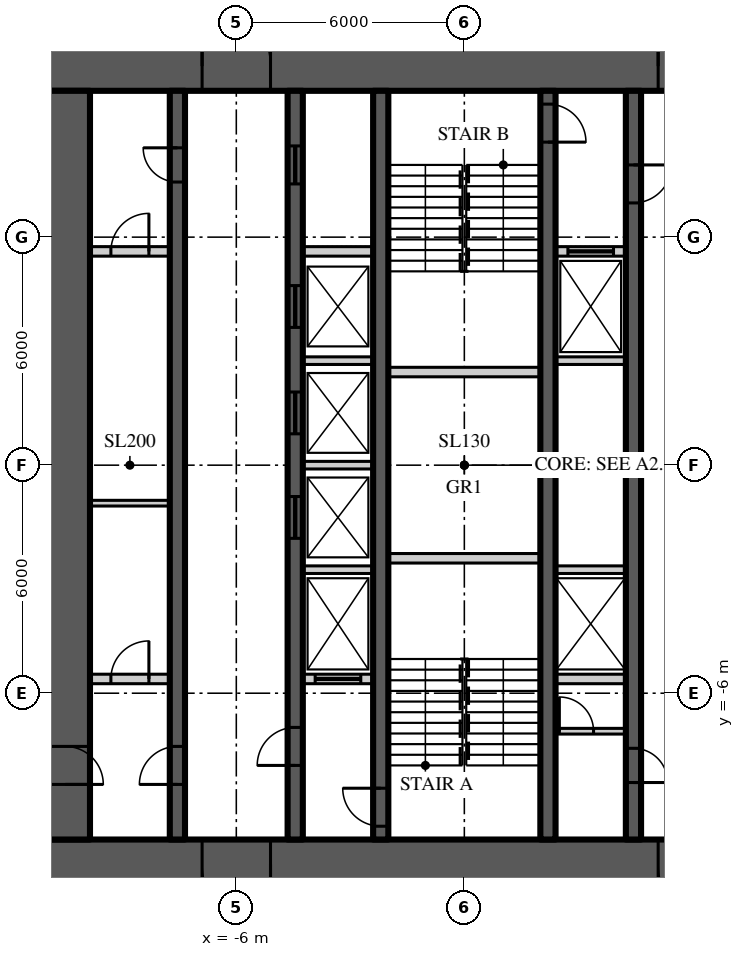
"""IFC4 building model, lengths in metres.
Left out: names, types, materials, properties, quantities, classifications, styles, units other than length and angle.
Written with IfcOpenShell. Run it as: python <this file> out.ifc"""

import sys

from ifc_helpers import new_model, si_unit, direction, frame, frame_2d, origin, place, context, subcontext, project, spatial, rectangle, extrude, element, fill, save


model = new_model("IFC4")
c1 = context("Model", 3, precision=1e-05, world=origin(), true_north=direction((0.0, 1.0)))
c2 = subcontext(c1, "Body", "Model", "MODEL_VIEW")
j1 = project(units=[si_unit("LENGTHUNIT", "METRE"), si_unit("PLANEANGLEUNIT", "RADIAN")], contexts=[c1])
p1 = place(None, origin())
s1 = spatial("IfcSite", under=j1, at=p1, CompositionType="ELEMENT")
p2 = place(p1, origin())
s2 = spatial("IfcBuilding", under=s1, at=p2, CompositionType="ELEMENT")
p3 = place(p2, frame((0.0, 0.0, 135.9)))
s3 = spatial("IfcBuildingStorey", under=s2, at=p3, CompositionType="ELEMENT", Elevation=135.9)
p4 = place(p3, frame((-11.15, 10.5, 0.0), z_axis=(0.0, 0.0, 1.0), x_axis=(1.0, 0.0, 0.0)))
e1 = element("IfcWall", 1, at=p4, inside=s3, PredefinedType="SHEAR", context=c2, shape_type="SweptSolid", body=[
    extrude(rectangle(XDim=22.3, YDim=1.3, at=frame_2d((11.15, 0.0))), origin(), (0.0, 0.0, 1.0), 3.9),
])
p5 = place(p4, frame((4.25, 0.0, 0.0)))
e2 = element("IfcOpeningElement", 2, at=p5, cuts=e1, PredefinedType="OPENING", context=c2, shape_type="SweptSolid", body=[
    extrude(rectangle(XDim=1.8, YDim=2.2, at=frame_2d((0.9, 1.1))), frame((0.0, 0.66, 0.0), z_axis=(0.0, -1.0, 0.0), x_axis=(1.0, 0.0, 0.0)), (0.0, 0.0, 1.0), 1.32),
])
p6 = place(p4, frame((16.25, 0.0, 0.0)))
e3 = element("IfcOpeningElement", 3, at=p6, cuts=e1, PredefinedType="OPENING", context=c2, shape_type="SweptSolid", body=[
    extrude(rectangle(XDim=1.8, YDim=2.2, at=frame_2d((0.9, 1.1))), frame((0.0, 0.66, 0.0), z_axis=(0.0, -1.0, 0.0), x_axis=(1.0, 0.0, 0.0)), (0.0, 0.0, 1.0), 1.32),
])
p7 = place(p3, frame((11.15, -10.5, 0.0), z_axis=(0.0, 0.0, 1.0), x_axis=(-1.0, 0.0, 0.0)))
e4 = element("IfcWall", 4, at=p7, inside=s3, PredefinedType="SHEAR", context=c2, shape_type="SweptSolid", body=[
    extrude(rectangle(XDim=22.3, YDim=1.3, at=frame_2d((11.15, 0.0))), origin(), (0.0, 0.0, 1.0), 3.9),
])
p8 = place(p7, frame((16.25, 0.0, 0.0)))
e5 = element("IfcOpeningElement", 5, at=p8, cuts=e4, PredefinedType="OPENING", context=c2, shape_type="SweptSolid", body=[
    extrude(rectangle(XDim=1.8, YDim=2.2, at=frame_2d((0.9, 1.1))), frame((0.0, 0.66, 0.0), z_axis=(0.0, -1.0, 0.0), x_axis=(1.0, 0.0, 0.0)), (0.0, 0.0, 1.0), 1.32),
])
p9 = place(p7, frame((4.25, 0.0, 0.0)))
e6 = element("IfcOpeningElement", 6, at=p9, cuts=e4, PredefinedType="OPENING", context=c2, shape_type="SweptSolid", body=[
    extrude(rectangle(XDim=1.8, YDim=2.2, at=frame_2d((0.9, 1.1))), frame((0.0, 0.66, 0.0), z_axis=(0.0, -1.0, 0.0), x_axis=(1.0, 0.0, 0.0)), (0.0, 0.0, 1.0), 1.32),
])
p10 = place(p3, frame((-10.5, 9.85, 0.0), z_axis=(0.0, 0.0, 1.0), x_axis=(0.0, -1.0, 0.0)))
e7 = element("IfcWall", 7, at=p10, inside=s3, PredefinedType="SHEAR", context=c2, shape_type="SweptSolid", body=[
    extrude(rectangle(XDim=19.7, YDim=1.3, at=frame_2d((9.85, 0.0))), origin(), (0.0, 0.0, 1.0), 3.9),
])
p11 = place(p10, frame((17.25, 0.0, 0.0)))
e8 = element("IfcOpeningElement", 8, at=p11, cuts=e7, PredefinedType="OPENING", context=c2, shape_type="SweptSolid", body=[
    extrude(rectangle(XDim=1.0, YDim=2.2, at=frame_2d((0.5, 1.1))), frame((0.0, 0.66, 0.0), z_axis=(0.0, -1.0, 0.0), x_axis=(1.0, 0.0, 0.0)), (0.0, 0.0, 1.0), 1.32),
])
p12 = place(p3, frame((-7.55, -9.85, 0.0), z_axis=(0.0, 0.0, 1.0), x_axis=(0.0, 1.0, 0.0)))
e9 = element("IfcWall", 9, at=p12, inside=s3, PredefinedType="SHEAR", context=c2, shape_type="SweptSolid", body=[
    extrude(rectangle(XDim=19.7, YDim=0.4, at=frame_2d((9.85, 0.0))), origin(), (0.0, 0.0, 1.0), 3.9),
])
p13 = place(p12, frame((1.45, 0.0, 0.0)))
e10 = element("IfcOpeningElement", 10, at=p13, cuts=e9, PredefinedType="OPENING", context=c2, shape_type="SweptSolid", body=[
    extrude(rectangle(XDim=1.0, YDim=2.2, at=frame_2d((0.5, 1.1))), frame((0.0, 0.21, 0.0), z_axis=(0.0, -1.0, 0.0), x_axis=(1.0, 0.0, 0.0)), (0.0, 0.0, 1.0), 0.42),
])
p14 = place(p12, frame((17.3, 0.0, 0.0)))
e11 = element("IfcOpeningElement", 11, at=p14, cuts=e9, PredefinedType="OPENING", context=c2, shape_type="SweptSolid", body=[
    extrude(rectangle(XDim=0.9, YDim=2.1, at=frame_2d((0.45, 1.05))), frame((0.0, 0.21, 0.0), z_axis=(0.0, -1.0, 0.0), x_axis=(1.0, 0.0, 0.0)), (0.0, 0.0, 1.0), 0.42),
])
p15 = place(p3, frame((-4.45, -9.85, 0.0), z_axis=(0.0, 0.0, 1.0), x_axis=(0.0, 1.0, 0.0)))
e12 = element("IfcWall", 12, at=p15, inside=s3, PredefinedType="SHEAR", context=c2, shape_type="SweptSolid", body=[
    extrude(rectangle(XDim=19.7, YDim=0.4, at=frame_2d((9.85, 0.0))), origin(), (0.0, 0.0, 1.0), 3.9),
])
p16 = place(p15, frame((1.95, 0.0, 0.0)))
e13 = element("IfcOpeningElement", 13, at=p16, cuts=e12, PredefinedType="OPENING", context=c2, shape_type="SweptSolid", body=[
    extrude(rectangle(XDim=1.0, YDim=2.2, at=frame_2d((0.5, 1.1))), frame((0.0, 0.21, 0.0), z_axis=(0.0, -1.0, 0.0), x_axis=(1.0, 0.0, 0.0)), (0.0, 0.0, 1.0), 0.42),
])
p17 = place(p15, frame((17.25, 0.0, 0.0)))
e14 = element("IfcOpeningElement", 14, at=p17, cuts=e12, PredefinedType="OPENING", context=c2, shape_type="SweptSolid", body=[
    extrude(rectangle(XDim=1.0, YDim=2.1, at=frame_2d((0.5, 1.05))), frame((0.0, 0.21, 0.0), z_axis=(0.0, -1.0, 0.0), x_axis=(1.0, 0.0, 0.0)), (0.0, 0.0, 1.0), 0.42),
])
p18 = place(p15, frame((7.925, 0.0, 0.0)))
e15 = element("IfcOpeningElement", 15, at=p18, cuts=e12, PredefinedType="OPENING", context=c2, shape_type="SweptSolid", body=[
    extrude(rectangle(XDim=1.1, YDim=2.2, at=frame_2d((0.55, 1.1))), frame((0.0, 0.21, 0.0), z_axis=(0.0, -1.0, 0.0), x_axis=(1.0, 0.0, 0.0)), (0.0, 0.0, 1.0), 0.42),
])
p19 = place(p15, frame((10.675, 0.0, 0.0)))
e16 = element("IfcOpeningElement", 16, at=p19, cuts=e12, PredefinedType="OPENING", context=c2, shape_type="SweptSolid", body=[
    extrude(rectangle(XDim=1.1, YDim=2.2, at=frame_2d((0.55, 1.1))), frame((0.0, 0.21, 0.0), z_axis=(0.0, -1.0, 0.0), x_axis=(1.0, 0.0, 0.0)), (0.0, 0.0, 1.0), 0.42),
])
p20 = place(p15, frame((13.475, 0.0, 0.0)))
e17 = element("IfcOpeningElement", 17, at=p20, cuts=e12, PredefinedType="OPENING", context=c2, shape_type="SweptSolid", body=[
    extrude(rectangle(XDim=1.1, YDim=2.2, at=frame_2d((0.55, 1.1))), frame((0.0, 0.21, 0.0), z_axis=(0.0, -1.0, 0.0), x_axis=(1.0, 0.0, 0.0)), (0.0, 0.0, 1.0), 0.42),
])
p21 = place(p3, frame((4.45, 9.85, 0.0), z_axis=(0.0, 0.0, 1.0), x_axis=(0.0, -1.0, 0.0)))
e18 = element("IfcWall", 18, at=p21, inside=s3, PredefinedType="SHEAR", context=c2, shape_type="SweptSolid", body=[
    extrude(rectangle(XDim=19.7, YDim=0.4, at=frame_2d((9.85, 0.0))), origin(), (0.0, 0.0, 1.0), 3.9),
])
p22 = place(p21, frame((1.95, 0.0, 0.0)))
e19 = element("IfcOpeningElement", 19, at=p22, cuts=e18, PredefinedType="OPENING", context=c2, shape_type="SweptSolid", body=[
    extrude(rectangle(XDim=1.0, YDim=2.2, at=frame_2d((0.5, 1.1))), frame((0.0, 0.21, 0.0), z_axis=(0.0, -1.0, 0.0), x_axis=(1.0, 0.0, 0.0)), (0.0, 0.0, 1.0), 0.42),
])
p23 = place(p21, frame((17.3, 0.0, 0.0)))
e20 = element("IfcOpeningElement", 20, at=p23, cuts=e18, PredefinedType="OPENING", context=c2, shape_type="SweptSolid", body=[
    extrude(rectangle(XDim=0.9, YDim=2.1, at=frame_2d((0.45, 1.05))), frame((0.0, 0.21, 0.0), z_axis=(0.0, -1.0, 0.0), x_axis=(1.0, 0.0, 0.0)), (0.0, 0.0, 1.0), 0.42),
])
p24 = place(p3, frame((-2.2, -9.85, 0.0), z_axis=(0.0, 0.0, 1.0), x_axis=(0.0, 1.0, 0.0)))
e21 = element("IfcWall", 21, at=p24, inside=s3, PredefinedType="SHEAR", context=c2, shape_type="SweptSolid", body=[
    extrude(rectangle(XDim=19.7, YDim=0.4, at=frame_2d((9.85, 0.0))), origin(), (0.0, 0.0, 1.0), 3.9),
])
p25 = place(p24, frame((0.35, 0.0, 0.0)))
e22 = element("IfcOpeningElement", 22, at=p25, cuts=e21, PredefinedType="OPENING", context=c2, shape_type="SweptSolid", body=[
    extrude(rectangle(XDim=1.0, YDim=2.2, at=frame_2d((0.5, 1.1))), frame((0.0, 0.21, 0.0), z_axis=(0.0, -1.0, 0.0), x_axis=(1.0, 0.0, 0.0)), (0.0, 0.0, 1.0), 0.42),
])
p26 = place(p3, frame((2.2, 9.85, 0.0), z_axis=(0.0, 0.0, 1.0), x_axis=(0.0, -1.0, 0.0)))
e23 = element("IfcWall", 23, at=p26, inside=s3, PredefinedType="SHEAR", context=c2, shape_type="SweptSolid", body=[
    extrude(rectangle(XDim=19.7, YDim=0.4, at=frame_2d((9.85, 0.0))), origin(), (0.0, 0.0, 1.0), 3.9),
])
p27 = place(p26, frame((0.35, 0.0, 0.0)))
e24 = element("IfcOpeningElement", 24, at=p27, cuts=e23, PredefinedType="OPENING", context=c2, shape_type="SweptSolid", body=[
    extrude(rectangle(XDim=1.0, YDim=2.2, at=frame_2d((0.5, 1.1))), frame((0.0, 0.21, 0.0), z_axis=(0.0, -1.0, 0.0), x_axis=(1.0, 0.0, 0.0)), (0.0, 0.0, 1.0), 0.42),
])
p28 = place(p3, frame((-9.85, 5.625, 0.0), z_axis=(0.0, 0.0, 1.0), x_axis=(1.0, 0.0, 0.0)))
e25 = element("IfcWall", 25, at=p28, inside=s3, PredefinedType="SOLIDWALL", context=c2, shape_type="SweptSolid", body=[
    extrude(rectangle(XDim=2.1, YDim=0.25, at=frame_2d((1.05, 0.0))), origin(), (0.0, 0.0, 1.0), 3.7),
])
p29 = place(p28, frame((0.55, 0.0, 0.0)))
e26 = element("IfcOpeningElement", 26, at=p29, cuts=e25, PredefinedType="OPENING", context=c2, shape_type="SweptSolid", body=[
    extrude(rectangle(XDim=1.0, YDim=2.2, at=frame_2d((0.5, 1.1))), frame((0.0, 0.135, 0.0), z_axis=(0.0, -1.0, 0.0), x_axis=(1.0, 0.0, 0.0)), (0.0, 0.0, 1.0), 0.27),
])
p30 = place(p3, frame((-4.25, 5.625, 0.0), z_axis=(0.0, 0.0, 1.0), x_axis=(1.0, 0.0, 0.0)))
e27 = element("IfcWall", 27, at=p30, inside=s3, PredefinedType="SOLIDWALL", context=c2, shape_type="SweptSolid", body=[
    extrude(rectangle(XDim=1.85, YDim=0.25, at=frame_2d((0.925, 0.0))), origin(), (0.0, 0.0, 1.0), 3.7),
])
p31 = place(p3, frame((2.4, 5.625, 0.0), z_axis=(0.0, 0.0, 1.0), x_axis=(1.0, 0.0, 0.0)))
e28 = element("IfcWall", 28, at=p31, inside=s3, PredefinedType="SOLIDWALL", context=c2, shape_type="SweptSolid", body=[
    extrude(rectangle(XDim=1.85, YDim=0.25, at=frame_2d((0.925, 0.0))), origin(), (0.0, 0.0, 1.0), 3.7),
])
p32 = place(p31, frame((0.325, 0.0, 0.0)))
e29 = element("IfcOpeningElement", 29, at=p32, cuts=e28, PredefinedType="OPENING", context=c2, shape_type="SweptSolid", body=[
    extrude(rectangle(XDim=1.2, YDim=2.2, at=frame_2d((0.6, 1.1))), frame((0.0, 0.135, 0.0), z_axis=(0.0, -1.0, 0.0), x_axis=(1.0, 0.0, 0.0)), (0.0, 0.0, 1.0), 0.27),
])
p33 = place(p3, frame((-9.85, -5.625, 0.0), z_axis=(0.0, 0.0, 1.0), x_axis=(1.0, 0.0, 0.0)))
e30 = element("IfcWall", 30, at=p33, inside=s3, PredefinedType="SOLIDWALL", context=c2, shape_type="SweptSolid", body=[
    extrude(rectangle(XDim=2.1, YDim=0.25, at=frame_2d((1.05, 0.0))), origin(), (0.0, 0.0, 1.0), 3.7),
])
p34 = place(p33, frame((0.55, 0.0, 0.0)))
e31 = element("IfcOpeningElement", 31, at=p34, cuts=e30, PredefinedType="OPENING", context=c2, shape_type="SweptSolid", body=[
    extrude(rectangle(XDim=1.0, YDim=2.2, at=frame_2d((0.5, 1.1))), frame((0.0, 0.135, 0.0), z_axis=(0.0, -1.0, 0.0), x_axis=(1.0, 0.0, 0.0)), (0.0, 0.0, 1.0), 0.27),
])
p35 = place(p3, frame((-4.25, -5.625, 0.0), z_axis=(0.0, 0.0, 1.0), x_axis=(1.0, 0.0, 0.0)))
e32 = element("IfcWall", 32, at=p35, inside=s3, PredefinedType="SOLIDWALL", context=c2, shape_type="SweptSolid", body=[
    extrude(rectangle(XDim=1.85, YDim=0.25, at=frame_2d((0.925, 0.0))), origin(), (0.0, 0.0, 1.0), 3.7),
])
p36 = place(p35, frame((0.325, 0.0, 0.0)))
e33 = element("IfcOpeningElement", 33, at=p36, cuts=e32, PredefinedType="OPENING", context=c2, shape_type="SweptSolid", body=[
    extrude(rectangle(XDim=1.2, YDim=2.2, at=frame_2d((0.6, 1.1))), frame((0.0, 0.135, 0.0), z_axis=(0.0, -1.0, 0.0), x_axis=(1.0, 0.0, 0.0)), (0.0, 0.0, 1.0), 0.27),
])
p37 = place(p3, frame((2.4, -5.625, 0.0), z_axis=(0.0, 0.0, 1.0), x_axis=(1.0, 0.0, 0.0)))
e34 = element("IfcWall", 34, at=p37, inside=s3, PredefinedType="SOLIDWALL", context=c2, shape_type="SweptSolid", body=[
    extrude(rectangle(XDim=1.85, YDim=0.25, at=frame_2d((0.925, 0.0))), origin(), (0.0, 0.0, 1.0), 3.7),
])
for number, where, z_axis, x_axis in (
    (35, (-2.0, -2.45, 0.0), (0.0, 0.0, 1.0), (1.0, 0.0, 0.0)),
    (36, (-2.0, 2.45, 0.0), (0.0, 0.0, 1.0), (1.0, 0.0, 0.0)),
):
    element("IfcWall", number, at=place(p3, frame(where, z_axis=z_axis, x_axis=x_axis)), inside=s3, PredefinedType="SOLIDWALL", context=c2, shape_type="SweptSolid", body=[
        extrude(rectangle(XDim=4.0, YDim=0.25, at=frame_2d((2.0, 0.0))), origin(), (0.0, 0.0, 1.0), 3.7),
    ])
for number, where, z_axis, x_axis in (
    (37, (-4.25, -2.75, 0.0), (0.0, 0.0, 1.0), (1.0, 0.0, 0.0)),
    (38, (2.4, -2.75, 0.0), (0.0, 0.0, 1.0), (1.0, 0.0, 0.0)),
    (39, (-4.25, 0.0, 0.0), (0.0, 0.0, 1.0), (1.0, 0.0, 0.0)),
    (40, (-4.25, 2.75, 0.0), (0.0, 0.0, 1.0), (1.0, 0.0, 0.0)),
    (41, (2.4, 2.75, 0.0), (0.0, 0.0, 1.0), (1.0, 0.0, 0.0)),
):
    element("IfcWall", number, at=place(p3, frame(where, z_axis=z_axis, x_axis=x_axis)), inside=s3, PredefinedType="SOLIDWALL", context=c2, shape_type="SweptSolid", body=[
        extrude(rectangle(XDim=1.85, YDim=0.2, at=frame_2d((0.925, 0.0))), origin(), (0.0, 0.0, 1.0), 3.7),
    ])
p38 = place(p3, frame((-9.85, -1.0, 0.0), z_axis=(0.0, 0.0, 1.0), x_axis=(1.0, 0.0, 0.0)))
e42 = element("IfcWall", 42, at=p38, inside=s3, PredefinedType="SOLIDWALL", context=c2, shape_type="SweptSolid", body=[
    extrude(rectangle(XDim=2.1, YDim=0.15, at=frame_2d((1.05, 0.0))), origin(), (0.0, 0.0, 1.0), 3.77),
])
p39 = place(p3, frame((2.4, -7.0, 0.0), z_axis=(0.0, 0.0, 1.0), x_axis=(1.0, 0.0, 0.0)))
e43 = element("IfcWall", 43, at=p39, inside=s3, PredefinedType="SOLIDWALL", context=c2, shape_type="SweptSolid", body=[
    extrude(rectangle(XDim=1.85, YDim=0.15, at=frame_2d((0.925, 0.0))), origin(), (0.0, 0.0, 1.0), 3.77),
])
p40 = place(p39, frame((0.1, 0.0, 0.0)))
e44 = element("IfcOpeningElement", 44, at=p40, cuts=e43, PredefinedType="OPENING", context=c2, shape_type="SweptSolid", body=[
    extrude(rectangle(XDim=0.9, YDim=2.1, at=frame_2d((0.45, 1.05))), frame((0.0, 0.085, 0.0), z_axis=(0.0, -1.0, 0.0), x_axis=(1.0, 0.0, 0.0)), (0.0, 0.0, 1.0), 0.17),
])
p41 = place(p5, origin())
e45 = element("IfcDoor", 45, at=p41, inside=s3, OperationType="DOUBLE_DOOR_DOUBLE_SWING", PredefinedType="DOOR", context=c2, shape_type="SweptSolid", body=[
    extrude(rectangle(XDim=1.8, YDim=2.2, at=frame_2d((0.9, 1.1))), frame((0.0, 0.025, 0.0), z_axis=(0.0, -1.0, 0.0), x_axis=(1.0, 0.0, 0.0)), (0.0, 0.0, 1.0), 0.05),
])
fill(e2, e45)
p42 = place(p8, origin())
e46 = element("IfcDoor", 46, at=p42, inside=s3, OperationType="DOUBLE_DOOR_DOUBLE_SWING", PredefinedType="DOOR", context=c2, shape_type="SweptSolid", body=[
    extrude(rectangle(XDim=1.8, YDim=2.2, at=frame_2d((0.9, 1.1))), frame((0.0, 0.025, 0.0), z_axis=(0.0, -1.0, 0.0), x_axis=(1.0, 0.0, 0.0)), (0.0, 0.0, 1.0), 0.05),
])
fill(e5, e46)
p43 = place(p6, origin())
e47 = element("IfcDoor", 47, at=p43, inside=s3, OperationType="DOUBLE_DOOR_DOUBLE_SWING", PredefinedType="DOOR", context=c2, shape_type="SweptSolid", body=[
    extrude(rectangle(XDim=1.8, YDim=2.2, at=frame_2d((0.9, 1.1))), frame((0.0, 0.025, 0.0), z_axis=(0.0, -1.0, 0.0), x_axis=(1.0, 0.0, 0.0)), (0.0, 0.0, 1.0), 0.05),
])
fill(e3, e47)
p44 = place(p9, origin())
e48 = element("IfcDoor", 48, at=p44, inside=s3, OperationType="DOUBLE_DOOR_DOUBLE_SWING", PredefinedType="DOOR", context=c2, shape_type="SweptSolid", body=[
    extrude(rectangle(XDim=1.8, YDim=2.2, at=frame_2d((0.9, 1.1))), frame((0.0, 0.025, 0.0), z_axis=(0.0, -1.0, 0.0), x_axis=(1.0, 0.0, 0.0)), (0.0, 0.0, 1.0), 0.05),
])
fill(e6, e48)
p45 = place(p13, origin())
e49 = element("IfcDoor", 49, at=p45, inside=s3, OperationType="SINGLE_SWING_LEFT", PredefinedType="DOOR", context=c2, shape_type="SweptSolid", body=[
    extrude(rectangle(XDim=1.0, YDim=2.2, at=frame_2d((0.5, 1.1))), frame((0.0, 0.025, 0.0), z_axis=(0.0, -1.0, 0.0), x_axis=(1.0, 0.0, 0.0)), (0.0, 0.0, 1.0), 0.05),
])
fill(e10, e49)
p46 = place(p11, origin())
e50 = element("IfcDoor", 50, at=p46, inside=s3, OperationType="SINGLE_SWING_RIGHT", PredefinedType="DOOR", context=c2, shape_type="SweptSolid", body=[
    extrude(rectangle(XDim=1.0, YDim=2.2, at=frame_2d((0.5, 1.1))), frame((0.0, 0.025, 0.0), z_axis=(0.0, -1.0, 0.0), x_axis=(1.0, 0.0, 0.0)), (0.0, 0.0, 1.0), 0.05),
])
fill(e8, e50)
p47 = place(p16, origin())
e51 = element("IfcDoor", 51, at=p47, inside=s3, OperationType="SINGLE_SWING_LEFT", PredefinedType="DOOR", context=c2, shape_type="SweptSolid", body=[
    extrude(rectangle(XDim=1.0, YDim=2.2, at=frame_2d((0.5, 1.1))), frame((0.0, 0.025, 0.0), z_axis=(0.0, -1.0, 0.0), x_axis=(1.0, 0.0, 0.0)), (0.0, 0.0, 1.0), 0.05),
])
fill(e13, e51)
p48 = place(p25, origin())
e52 = element("IfcDoor", 52, at=p48, inside=s3, OperationType="SINGLE_SWING_RIGHT", PredefinedType="DOOR", context=c2, shape_type="SweptSolid", body=[
    extrude(rectangle(XDim=1.0, YDim=2.2, at=frame_2d((0.5, 1.1))), frame((0.0, 0.025, 0.0), z_axis=(0.0, -1.0, 0.0), x_axis=(1.0, 0.0, 0.0)), (0.0, 0.0, 1.0), 0.05),
])
fill(e22, e52)
p49 = place(p22, origin())
e53 = element("IfcDoor", 53, at=p49, inside=s3, OperationType="SINGLE_SWING_LEFT", PredefinedType="DOOR", context=c2, shape_type="SweptSolid", body=[
    extrude(rectangle(XDim=1.0, YDim=2.2, at=frame_2d((0.5, 1.1))), frame((0.0, 0.025, 0.0), z_axis=(0.0, -1.0, 0.0), x_axis=(1.0, 0.0, 0.0)), (0.0, 0.0, 1.0), 0.05),
])
fill(e19, e53)
p50 = place(p27, origin())
e54 = element("IfcDoor", 54, at=p50, inside=s3, OperationType="SINGLE_SWING_RIGHT", PredefinedType="DOOR", context=c2, shape_type="SweptSolid", body=[
    extrude(rectangle(XDim=1.0, YDim=2.2, at=frame_2d((0.5, 1.1))), frame((0.0, 0.025, 0.0), z_axis=(0.0, -1.0, 0.0), x_axis=(1.0, 0.0, 0.0)), (0.0, 0.0, 1.0), 0.05),
])
fill(e24, e54)
p51 = place(p14, origin())
e55 = element("IfcDoor", 55, at=p51, inside=s3, OperationType="SINGLE_SWING_RIGHT", PredefinedType="DOOR", context=c2, shape_type="SweptSolid", body=[
    extrude(rectangle(XDim=0.9, YDim=2.1, at=frame_2d((0.45, 1.05))), frame((0.0, 0.025, 0.0), z_axis=(0.0, -1.0, 0.0), x_axis=(1.0, 0.0, 0.0)), (0.0, 0.0, 1.0), 0.05),
])
fill(e11, e55)
p52 = place(p17, origin())
e56 = element("IfcDoor", 56, at=p52, inside=s3, OperationType="SLIDING_TO_LEFT", PredefinedType="DOOR", context=c2, shape_type="SweptSolid", body=[
    extrude(rectangle(XDim=1.0, YDim=2.1, at=frame_2d((0.5, 1.05))), frame((0.0, 0.025, 0.0), z_axis=(0.0, -1.0, 0.0), x_axis=(1.0, 0.0, 0.0)), (0.0, 0.0, 1.0), 0.05),
])
fill(e14, e56)
p53 = place(p23, origin())
e57 = element("IfcDoor", 57, at=p53, inside=s3, OperationType="SINGLE_SWING_RIGHT", PredefinedType="DOOR", context=c2, shape_type="SweptSolid", body=[
    extrude(rectangle(XDim=0.9, YDim=2.1, at=frame_2d((0.45, 1.05))), frame((0.0, 0.025, 0.0), z_axis=(0.0, -1.0, 0.0), x_axis=(1.0, 0.0, 0.0)), (0.0, 0.0, 1.0), 0.05),
])
fill(e20, e57)
p54 = place(p18, origin())
e58 = element("IfcDoor", 58, at=p54, inside=s3, OperationType="SLIDING_TO_LEFT", PredefinedType="DOOR", context=c2, shape_type="SweptSolid", body=[
    extrude(rectangle(XDim=1.1, YDim=2.2, at=frame_2d((0.55, 1.1))), frame((0.0, 0.025, 0.0), z_axis=(0.0, -1.0, 0.0), x_axis=(1.0, 0.0, 0.0)), (0.0, 0.0, 1.0), 0.05),
])
fill(e15, e58)
p55 = place(p19, origin())
e59 = element("IfcDoor", 59, at=p55, inside=s3, OperationType="SLIDING_TO_LEFT", PredefinedType="DOOR", context=c2, shape_type="SweptSolid", body=[
    extrude(rectangle(XDim=1.1, YDim=2.2, at=frame_2d((0.55, 1.1))), frame((0.0, 0.025, 0.0), z_axis=(0.0, -1.0, 0.0), x_axis=(1.0, 0.0, 0.0)), (0.0, 0.0, 1.0), 0.05),
])
fill(e16, e59)
p56 = place(p20, origin())
e60 = element("IfcDoor", 60, at=p56, inside=s3, OperationType="SLIDING_TO_LEFT", PredefinedType="DOOR", context=c2, shape_type="SweptSolid", body=[
    extrude(rectangle(XDim=1.1, YDim=2.2, at=frame_2d((0.55, 1.1))), frame((0.0, 0.025, 0.0), z_axis=(0.0, -1.0, 0.0), x_axis=(1.0, 0.0, 0.0)), (0.0, 0.0, 1.0), 0.05),
])
fill(e17, e60)
p57 = place(p36, origin())
e61 = element("IfcDoor", 61, at=p57, inside=s3, OperationType="SLIDING_TO_LEFT", PredefinedType="DOOR", context=c2, shape_type="SweptSolid", body=[
    extrude(rectangle(XDim=1.2, YDim=2.2, at=frame_2d((0.6, 1.1))), frame((0.0, 0.025, 0.0), z_axis=(0.0, -1.0, 0.0), x_axis=(1.0, 0.0, 0.0)), (0.0, 0.0, 1.0), 0.05),
])
fill(e33, e61)
p58 = place(p32, origin())
e62 = element("IfcDoor", 62, at=p58, inside=s3, OperationType="SLIDING_TO_LEFT", PredefinedType="DOOR", context=c2, shape_type="SweptSolid", body=[
    extrude(rectangle(XDim=1.2, YDim=2.2, at=frame_2d((0.6, 1.1))), frame((0.0, 0.025, 0.0), z_axis=(0.0, -1.0, 0.0), x_axis=(1.0, 0.0, 0.0)), (0.0, 0.0, 1.0), 0.05),
])
fill(e29, e62)
p59 = place(p29, origin())
e63 = element("IfcDoor", 63, at=p59, inside=s3, OperationType="SINGLE_SWING_RIGHT", PredefinedType="DOOR", context=c2, shape_type="SweptSolid", body=[
    extrude(rectangle(XDim=1.0, YDim=2.2, at=frame_2d((0.5, 1.1))), frame((0.0, 0.025, 0.0), z_axis=(0.0, -1.0, 0.0), x_axis=(1.0, 0.0, 0.0)), (0.0, 0.0, 1.0), 0.05),
])
fill(e26, e63)
p60 = place(p34, origin())
e64 = element("IfcDoor", 64, at=p60, inside=s3, OperationType="SINGLE_SWING_RIGHT", PredefinedType="DOOR", context=c2, shape_type="SweptSolid", body=[
    extrude(rectangle(XDim=1.0, YDim=2.2, at=frame_2d((0.5, 1.1))), frame((0.0, 0.025, 0.0), z_axis=(0.0, -1.0, 0.0), x_axis=(1.0, 0.0, 0.0)), (0.0, 0.0, 1.0), 0.05),
])
fill(e31, e64)
p61 = place(p40, origin())
e65 = element("IfcDoor", 65, at=p61, inside=s3, OperationType="SINGLE_SWING_LEFT", PredefinedType="DOOR", context=c2, shape_type="SweptSolid", body=[
    extrude(rectangle(XDim=0.9, YDim=2.1, at=frame_2d((0.45, 1.05))), frame((0.0, 0.025, 0.0), z_axis=(0.0, -1.0, 0.0), x_axis=(1.0, 0.0, 0.0)), (0.0, 0.0, 1.0), 0.05),
])
fill(e44, e65)
save(model, sys.argv[1])
